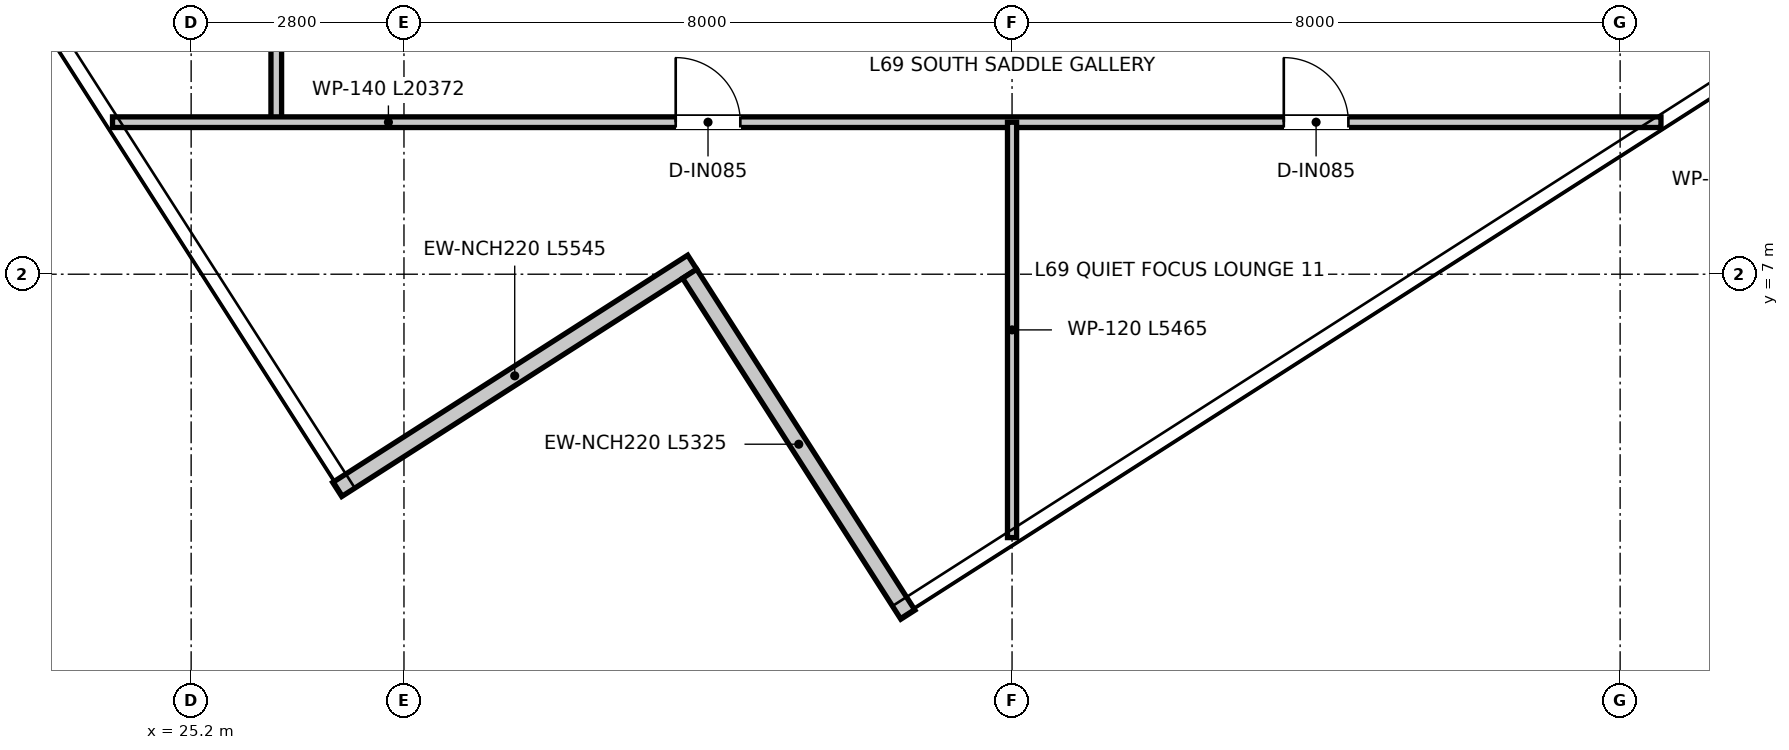
"""IFC4 building model, lengths in metres.
Left out: names, types, materials, properties, quantities, classifications, styles, units other than length and angle.
Written with IfcOpenShell. Run it as: python <this file> out.ifc"""

import sys

from ifc_helpers import new_model, si_unit, direction, frame, frame_2d, origin, place, context, subcontext, project, spatial, rectangle, extrude, element, fill, save


model = new_model("IFC4")
c1 = context("Model", 3, precision=1e-05, world=origin(), true_north=direction((0.0, 1.0)))
c2 = subcontext(c1, "Body", "Model", "MODEL_VIEW")
j1 = project(units=[si_unit("LENGTHUNIT", "METRE"), si_unit("PLANEANGLEUNIT", "RADIAN")], contexts=[c1])
p1 = place(None, origin())
s1 = spatial("IfcSite", under=j1, at=p1, CompositionType="ELEMENT")
p2 = place(p1, origin())
s2 = spatial("IfcBuilding", under=s1, at=p2, CompositionType="ELEMENT")
p3 = place(p2, frame((0.0, 0.0, 283.2)))
s3 = spatial("IfcBuildingStorey", under=s2, at=p3, CompositionType="ELEMENT", Elevation=283.2)
p4 = place(p3, frame((27.122, 4.168, 0.0), z_axis=(0.0, 0.0, 1.0), x_axis=(0.842222620948, 0.539129907131, 0.0)))
e1 = element("IfcWall", 1, at=p4, inside=s3, PredefinedType="ELEMENTEDWALL", context=c2, shape_type="SweptSolid", body=[
    extrude(rectangle(XDim=5.545, YDim=0.22, at=frame_2d((2.772, 0.0))), origin(), (0.0, 0.0, 1.0), 3.67),
])
p5 = place(p3, frame((31.759, 7.006, 0.0), z_axis=(0.0, 0.0, 1.0), x_axis=(0.539157771194, -0.842204783744, 0.0)))
e2 = element("IfcWall", 2, at=p5, inside=s3, PredefinedType="ELEMENTEDWALL", context=c2, shape_type="SweptSolid", body=[
    extrude(rectangle(XDim=5.325, YDim=0.22, at=frame_2d((2.663, 0.0))), origin(), (0.0, 0.0, 1.0), 3.67),
])
p6 = place(p3, frame((26.32, 9.0, 0.0), z_axis=(0.0, 0.0, 1.0), x_axis=(0.0, 1.0, 0.0)))
e3 = element("IfcWall", 3, at=p6, inside=s3, PredefinedType="PARTITIONING", context=c2, shape_type="SweptSolid", body=[
    extrude(rectangle(XDim=19.66, YDim=0.14, at=frame_2d((9.83, 0.0))), origin(), (0.0, 0.0, 1.0), 3.13),
])
p7 = place(p6, frame((18.3, 0.0, 0.0)))
e4 = element("IfcOpeningElement", 4, at=p7, cuts=e3, PredefinedType="OPENING", context=c2, shape_type="SweptSolid", body=[
    extrude(rectangle(XDim=0.9, YDim=2.1, at=frame_2d((0.45, 1.05))), frame((0.0, 0.08, 0.0), z_axis=(0.0, -1.0, 0.0), x_axis=(1.0, 0.0, 0.0)), (0.0, 0.0, 1.0), 0.16),
])
p8 = place(p6, frame((12.71, 0.0, 0.0)))
e5 = element("IfcOpeningElement", 5, at=p8, cuts=e3, PredefinedType="OPENING", context=c2, shape_type="SweptSolid", body=[
    extrude(rectangle(XDim=0.9, YDim=2.1, at=frame_2d((0.45, 1.05))), frame((0.0, 0.08, 0.0), z_axis=(0.0, -1.0, 0.0), x_axis=(1.0, 0.0, 0.0)), (0.0, 0.0, 1.0), 0.16),
])
p9 = place(p3, frame((24.166, 9.0, 0.0), z_axis=(0.0, 0.0, 1.0), x_axis=(1.0, 0.0, 0.0)))
e6 = element("IfcWall", 6, at=p9, inside=s3, PredefinedType="PARTITIONING", context=c2, shape_type="SweptSolid", body=[
    extrude(rectangle(XDim=20.372, YDim=0.14, at=frame_2d((10.186, 0.0))), origin(), (0.0, 0.0, 1.0), 3.67),
])
p10 = place(p9, frame((7.409, 0.0, 0.0)))
e7 = element("IfcOpeningElement", 7, at=p10, cuts=e6, PredefinedType="OPENING", context=c2, shape_type="SweptSolid", body=[
    extrude(rectangle(XDim=0.85, YDim=2.1, at=frame_2d((0.425, 1.05))), frame((0.0, 0.08, 0.0), z_axis=(0.0, -1.0, 0.0), x_axis=(1.0, 0.0, 0.0)), (0.0, 0.0, 1.0), 0.16),
])
p11 = place(p9, frame((15.409, 0.0, 0.0)))
e8 = element("IfcOpeningElement", 8, at=p11, cuts=e6, PredefinedType="OPENING", context=c2, shape_type="SweptSolid", body=[
    extrude(rectangle(XDim=0.85, YDim=2.1, at=frame_2d((0.425, 1.05))), frame((0.0, 0.08, 0.0), z_axis=(0.0, -1.0, 0.0), x_axis=(1.0, 0.0, 0.0)), (0.0, 0.0, 1.0), 0.16),
])
p12 = place(p3, frame((36.0, 3.535, 0.0), z_axis=(0.0, 0.0, 1.0), x_axis=(0.0, 1.0, 0.0)))
e9 = element("IfcWall", 9, at=p12, inside=s3, PredefinedType="PARTITIONING", context=c2, shape_type="SweptSolid", body=[
    extrude(rectangle(XDim=5.465, YDim=0.12, at=frame_2d((2.732, 0.0))), origin(), (0.0, 0.0, 1.0), 3.67),
])
p13 = place(p10, origin())
e10 = element("IfcDoor", 10, at=p13, inside=s3, OperationType="SINGLE_SWING_LEFT", PredefinedType="DOOR", context=c2, shape_type="SweptSolid", body=[
    extrude(rectangle(XDim=0.85, YDim=2.1, at=frame_2d((0.425, 1.05))), frame((0.0, 0.025, 0.0), z_axis=(0.0, -1.0, 0.0), x_axis=(1.0, 0.0, 0.0)), (0.0, 0.0, 1.0), 0.05),
])
fill(e7, e10)
p14 = place(p11, origin())
e11 = element("IfcDoor", 11, at=p14, inside=s3, OperationType="SINGLE_SWING_LEFT", PredefinedType="DOOR", context=c2, shape_type="SweptSolid", body=[
    extrude(rectangle(XDim=0.85, YDim=2.1, at=frame_2d((0.425, 1.05))), frame((0.0, 0.025, 0.0), z_axis=(0.0, -1.0, 0.0), x_axis=(1.0, 0.0, 0.0)), (0.0, 0.0, 1.0), 0.05),
])
fill(e8, e11)
save(model, sys.argv[1])
